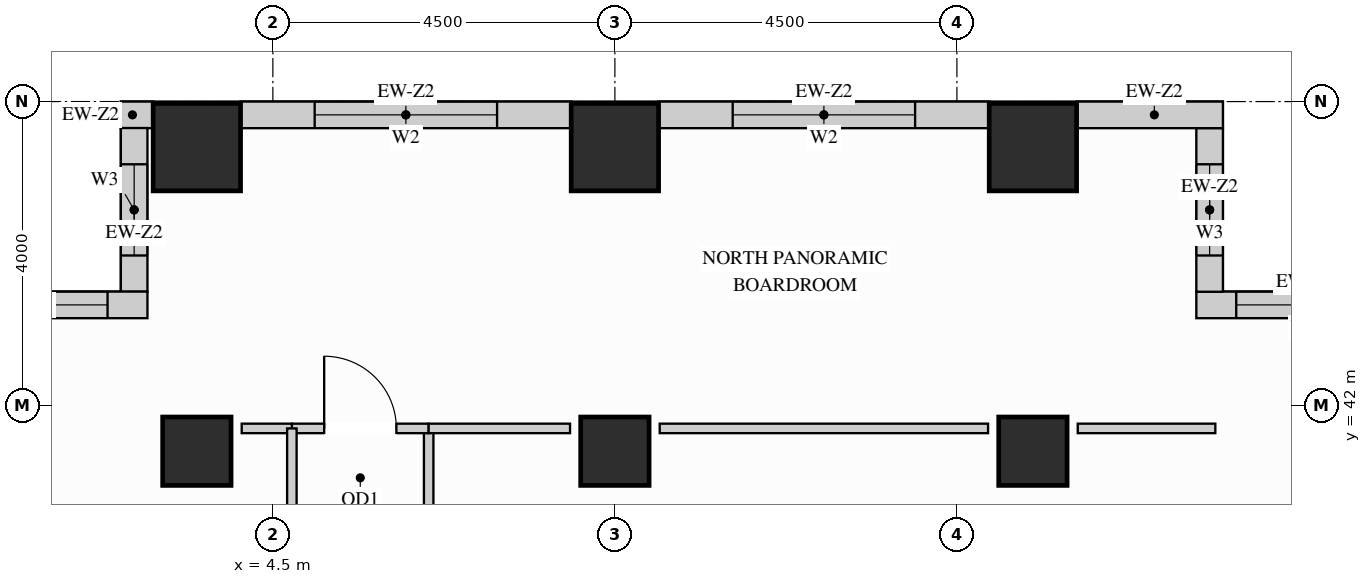
"""IFC4 building model, lengths in metres.
Left out: names, types, materials, properties, quantities, classifications, styles, units other than length and angle.
Written with IfcOpenShell. Run it as: python <this file> out.ifc"""

import sys

from ifc_helpers import new_model, si_unit, direction, frame, frame_2d, origin, origin_2d, place, context, subcontext, project, spatial, rectangle, extrude, source, transform, mapped, element, fill, save


model = new_model("IFC4")
c1 = context("Model", 3, precision=1e-05, world=origin(), true_north=direction((0.0, 1.0)))
c2 = subcontext(c1, "Body", "Model", "MODEL_VIEW")
j1 = project(units=[si_unit("LENGTHUNIT", "METRE"), si_unit("PLANEANGLEUNIT", "RADIAN")], contexts=[c1])
p1 = place(None, origin())
s1 = spatial("IfcSite", under=j1, at=p1, CompositionType="ELEMENT")
p2 = place(p1, origin())
s2 = spatial("IfcBuilding", under=s1, at=p2, CompositionType="ELEMENT")
p3 = place(p2, frame((0.0, 0.0, 135.0)))
s3 = spatial("IfcBuildingStorey", under=s2, at=p3, CompositionType="ELEMENT", Elevation=135.0)
m1 = source(origin(), c2, "Body", "SweptSolid", [
    extrude(rectangle(XDim=0.9, YDim=0.9, at=origin_2d()), origin(), (0.0, 0.0, 1.0), 3.32),
])
for number, where, z_axis, x_axis in (
    (1, (14.5, 41.4, 0.0), (0.0, 0.0, 1.0), (1.0, 0.0, 0.0)),
    (2, (3.5, 41.4, 0.0), (0.0, 0.0, 1.0), (1.0, 0.0, 0.0)),
    (3, (9.0, 41.4, 0.0), (0.0, 0.0, 1.0), (1.0, 0.0, 0.0)),
):
    element("IfcColumn", number, at=place(p3, frame(where, z_axis=z_axis, x_axis=x_axis)), inside=s3, PredefinedType="COLUMN", context=c2, shape_type="MappedRepresentation", body=[
        mapped(m1, transform((0.0, 0.0, 0.0), x_axis=(1.0, 0.0, 0.0), y_axis=(0.0, 1.0, 0.0), z_axis=(0.0, 0.0, 1.0))),
    ])
m2 = source(origin(), c2, "Body", "SweptSolid", [
    extrude(rectangle(XDim=1.15, YDim=1.15, at=origin_2d()), origin(), (0.0, 0.0, 1.0), 3.32),
])
for number, where, z_axis, x_axis in (
    (4, (14.5, 45.4, 0.0), (0.0, 0.0, 1.0), (1.0, 0.0, 0.0)),
    (5, (3.5, 45.4, 0.0), (0.0, 0.0, 1.0), (1.0, 0.0, 0.0)),
    (6, (9.0, 45.4, 0.0), (0.0, 0.0, 1.0), (1.0, 0.0, 0.0)),
):
    element("IfcColumn", number, at=place(p3, frame(where, z_axis=z_axis, x_axis=x_axis)), inside=s3, PredefinedType="COLUMN", context=c2, shape_type="MappedRepresentation", body=[
        mapped(m2, transform((0.0, 0.0, 0.0), x_axis=(1.0, 0.0, 0.0), y_axis=(0.0, 1.0, 0.0), z_axis=(0.0, 0.0, 1.0))),
    ])
p4 = place(p3, frame((19.5, 43.325, 0.0), z_axis=(0.0, 0.0, 1.0), x_axis=(-1.0, 0.0, 0.0)))
e7 = element("IfcWall", 7, at=p4, inside=s3, PredefinedType="SOLIDWALL", context=c2, shape_type="SweptSolid", body=[
    extrude(rectangle(XDim=2.85, YDim=0.35, at=frame_2d((1.425, 0.0))), origin(), (0.0, 0.0, 1.0), 3.305),
])
p5 = place(p4, frame((0.525, 0.0, 0.78)))
e8 = element("IfcOpeningElement", 8, at=p5, cuts=e7, PredefinedType="OPENING", context=c2, shape_type="SweptSolid", body=[
    extrude(rectangle(XDim=1.8, YDim=2.1, at=frame_2d((0.9, 1.05))), frame((0.0, 0.185, 0.0), z_axis=(0.0, -1.0, 0.0), x_axis=(1.0, 0.0, 0.0)), (0.0, 0.0, 1.0), 0.37),
])
p6 = place(p3, frame((16.825, 43.498, 0.0), z_axis=(0.0, 0.0, 1.0), x_axis=(0.0, 1.0, 0.0)))
e9 = element("IfcWall", 9, at=p6, inside=s3, PredefinedType="SOLIDWALL", context=c2, shape_type="SweptSolid", body=[
    extrude(rectangle(XDim=2.154, YDim=0.35, at=frame_2d((1.077, 0.0))), origin(), (0.0, 0.0, 1.0), 3.305),
])
p7 = place(p6, frame((0.477, 0.0, 0.78)))
e10 = element("IfcOpeningElement", 10, at=p7, cuts=e9, PredefinedType="OPENING", context=c2, shape_type="SweptSolid", body=[
    extrude(rectangle(XDim=1.2, YDim=2.1, at=frame_2d((0.6, 1.05))), frame((0.0, 0.185, 0.0), z_axis=(0.0, -1.0, 0.0), x_axis=(1.0, 0.0, 0.0)), (0.0, 0.0, 1.0), 0.37),
])
m3 = source(origin(), c2, "Body", "SweptSolid", [
    extrude(rectangle(XDim=1.927, YDim=0.35, at=frame_2d((0.963, 0.0))), origin(), (0.0, 0.0, 1.0), 3.305),
])
p8 = place(p3, frame((17.0, 45.825, 0.0), z_axis=(0.0, 0.0, 1.0), x_axis=(-1.0, 0.0, 0.0)))
e11 = element("IfcWall", 11, at=p8, inside=s3, PredefinedType="SOLIDWALL", context=c2, shape_type="MappedRepresentation", body=[
    mapped(m3, transform((0.0, 0.0, 0.0), x_axis=(1.0, 0.0, 0.0), y_axis=(0.0, 1.0, 0.0), z_axis=(0.0, 0.0, 1.0))),
])
p9 = place(p3, frame((13.927, 45.825, 0.0), z_axis=(0.0, 0.0, 1.0), x_axis=(-1.0, 0.0, 0.0)))
e12 = element("IfcWall", 12, at=p9, inside=s3, PredefinedType="SOLIDWALL", context=c2, shape_type="SweptSolid", body=[
    extrude(rectangle(XDim=4.354, YDim=0.35, at=frame_2d((2.177, 0.0))), origin(), (0.0, 0.0, 1.0), 3.305),
])
p10 = place(p9, frame((0.977, 0.0, 0.78)))
e13 = element("IfcOpeningElement", 13, at=p10, cuts=e12, PredefinedType="OPENING", context=c2, shape_type="SweptSolid", body=[
    extrude(rectangle(XDim=2.4, YDim=2.1, at=frame_2d((1.2, 1.05))), frame((0.0, 0.185, 0.0), z_axis=(0.0, -1.0, 0.0), x_axis=(1.0, 0.0, 0.0)), (0.0, 0.0, 1.0), 0.37),
])
p11 = place(p3, frame((8.427, 45.825, 0.0), z_axis=(0.0, 0.0, 1.0), x_axis=(-1.0, 0.0, 0.0)))
e14 = element("IfcWall", 14, at=p11, inside=s3, PredefinedType="SOLIDWALL", context=c2, shape_type="SweptSolid", body=[
    extrude(rectangle(XDim=4.354, YDim=0.35, at=frame_2d((2.177, 0.0))), origin(), (0.0, 0.0, 1.0), 3.305),
])
p12 = place(p11, frame((0.977, 0.0, 0.78)))
e15 = element("IfcOpeningElement", 15, at=p12, cuts=e14, PredefinedType="OPENING", context=c2, shape_type="SweptSolid", body=[
    extrude(rectangle(XDim=2.4, YDim=2.1, at=frame_2d((1.2, 1.05))), frame((0.0, 0.185, 0.0), z_axis=(0.0, -1.0, 0.0), x_axis=(1.0, 0.0, 0.0)), (0.0, 0.0, 1.0), 0.37),
])
m4 = source(origin(), c2, "Body", "SweptSolid", [
    extrude(rectangle(XDim=0.427, YDim=0.35, at=frame_2d((0.213, 0.0))), origin(), (0.0, 0.0, 1.0), 3.305),
])
p13 = place(p3, frame((2.927, 45.825, 0.0), z_axis=(0.0, 0.0, 1.0), x_axis=(-1.0, 0.0, 0.0)))
e16 = element("IfcWall", 16, at=p13, inside=s3, PredefinedType="SOLIDWALL", context=c2, shape_type="MappedRepresentation", body=[
    mapped(m4, transform((0.0, 0.0, 0.0), x_axis=(1.0, 0.0, 0.0), y_axis=(0.0, 1.0, 0.0), z_axis=(0.0, 0.0, 1.0))),
])
p14 = place(p3, frame((2.675, 45.652, 0.0), z_axis=(0.0, 0.0, 1.0), x_axis=(0.0, -1.0, 0.0)))
e17 = element("IfcWall", 17, at=p14, inside=s3, PredefinedType="SOLIDWALL", context=c2, shape_type="SweptSolid", body=[
    extrude(rectangle(XDim=2.154, YDim=0.35, at=frame_2d((1.077, 0.0))), origin(), (0.0, 0.0, 1.0), 3.305),
])
p15 = place(p14, frame((0.477, 0.0, 0.78)))
e18 = element("IfcOpeningElement", 18, at=p15, cuts=e17, PredefinedType="OPENING", context=c2, shape_type="SweptSolid", body=[
    extrude(rectangle(XDim=1.2, YDim=2.1, at=frame_2d((0.6, 1.05))), frame((0.0, 0.185, 0.0), z_axis=(0.0, -1.0, 0.0), x_axis=(1.0, 0.0, 0.0)), (0.0, 0.0, 1.0), 0.37),
])
p16 = place(p3, frame((2.85, 43.325, 0.0), z_axis=(0.0, 0.0, 1.0), x_axis=(-1.0, 0.0, 0.0)))
e19 = element("IfcWall", 19, at=p16, inside=s3, PredefinedType="SOLIDWALL", context=c2, shape_type="SweptSolid", body=[
    extrude(rectangle(XDim=2.85, YDim=0.35, at=frame_2d((1.425, 0.0))), origin(), (0.0, 0.0, 1.0), 3.305),
])
p17 = place(p16, frame((0.525, 0.0, 0.78)))
e20 = element("IfcOpeningElement", 20, at=p17, cuts=e19, PredefinedType="OPENING", context=c2, shape_type="SweptSolid", body=[
    extrude(rectangle(XDim=1.8, YDim=2.1, at=frame_2d((0.9, 1.05))), frame((0.0, 0.185, 0.0), z_axis=(0.0, -1.0, 0.0), x_axis=(1.0, 0.0, 0.0)), (0.0, 0.0, 1.0), 0.37),
])
p18 = place(p3, frame((6.55, 33.15, 0.0), z_axis=(0.0, 0.0, 1.0), x_axis=(0.0, 1.0, 0.0)))
e21 = element("IfcWall", 21, at=p18, inside=s3, PredefinedType="PARTITIONING", context=c2, shape_type="SweptSolid", body=[
    extrude(rectangle(XDim=8.55, YDim=0.125, at=frame_2d((4.275, 0.0))), origin(), (0.0, 0.0, 1.0), 3.305),
])
p19 = place(p18, frame((3.8, 0.0, 0.0)))
e22 = element("IfcOpeningElement", 22, at=p19, cuts=e21, PredefinedType="OPENING", context=c2, shape_type="SweptSolid", body=[
    extrude(rectangle(XDim=0.95, YDim=2.15, at=frame_2d((0.475, 1.075))), frame((0.0, 0.073, 0.0), z_axis=(0.0, -1.0, 0.0), x_axis=(1.0, 0.0, 0.0)), (0.0, 0.0, 1.0), 0.145),
])
p20 = place(p3, frame((4.75, 41.7, 0.0), z_axis=(0.0, 0.0, 1.0), x_axis=(1.0, 0.0, 0.0)))
e23 = element("IfcWall", 23, at=p20, inside=s3, PredefinedType="PARTITIONING", context=c2, shape_type="SweptSolid", body=[
    extrude(rectangle(XDim=1.8, YDim=0.125, at=frame_2d((0.9, 0.0))), origin(), (0.0, 0.0, 1.0), 3.305),
])
p21 = place(p20, frame((0.425, 0.0, 0.0)))
e24 = element("IfcOpeningElement", 24, at=p21, cuts=e23, PredefinedType="OPENING", context=c2, shape_type="SweptSolid", body=[
    extrude(rectangle(XDim=0.95, YDim=2.15, at=frame_2d((0.475, 1.075))), frame((0.0, 0.073, 0.0), z_axis=(0.0, -1.0, 0.0), x_axis=(1.0, 0.0, 0.0)), (0.0, 0.0, 1.0), 0.145),
])
m5 = source(origin(), c2, "Body", "SweptSolid", [
    extrude(rectangle(XDim=1.86, YDim=0.125, at=frame_2d((0.93, 0.0))), origin(), (0.0, 0.0, 1.0), 3.305),
])
p22 = place(p3, frame((6.55, 41.7, 0.0), z_axis=(0.0, 0.0, 1.0), x_axis=(1.0, 0.0, 0.0)))
e25 = element("IfcWall", 25, at=p22, inside=s3, PredefinedType="PARTITIONING", context=c2, shape_type="MappedRepresentation", body=[
    mapped(m5, transform((0.0, 0.0, 0.0), x_axis=(1.0, 0.0, 0.0), y_axis=(0.0, 1.0, 0.0), z_axis=(0.0, 0.0, 1.0))),
])
m6 = source(origin(), c2, "Body", "SweptSolid", [
    extrude(rectangle(XDim=4.32, YDim=0.125, at=frame_2d((2.16, 0.0))), origin(), (0.0, 0.0, 1.0), 3.305),
])
p23 = place(p3, frame((9.59, 41.7, 0.0), z_axis=(0.0, 0.0, 1.0), x_axis=(1.0, 0.0, 0.0)))
e26 = element("IfcWall", 26, at=p23, inside=s3, PredefinedType="PARTITIONING", context=c2, shape_type="MappedRepresentation", body=[
    mapped(m6, transform((0.0, 0.0, 0.0), x_axis=(1.0, 0.0, 0.0), y_axis=(0.0, 1.0, 0.0), z_axis=(0.0, 0.0, 1.0))),
])
m7 = source(origin(), c2, "Body", "SweptSolid", [
    extrude(rectangle(XDim=1.81, YDim=0.125, at=frame_2d((0.905, 0.0))), origin(), (0.0, 0.0, 1.0), 3.305),
])
p24 = place(p3, frame((15.09, 41.7, 0.0), z_axis=(0.0, 0.0, 1.0), x_axis=(1.0, 0.0, 0.0)))
e27 = element("IfcWall", 27, at=p24, inside=s3, PredefinedType="PARTITIONING", context=c2, shape_type="MappedRepresentation", body=[
    mapped(m7, transform((0.0, 0.0, 0.0), x_axis=(1.0, 0.0, 0.0), y_axis=(0.0, 1.0, 0.0), z_axis=(0.0, 0.0, 1.0))),
])
m8 = source(origin(), c2, "Body", "SweptSolid", [
    extrude(rectangle(XDim=0.66, YDim=0.125, at=frame_2d((0.33, 0.0))), origin(), (0.0, 0.0, 1.0), 3.305),
])
p25 = place(p3, frame((4.09, 41.7, 0.0), z_axis=(0.0, 0.0, 1.0), x_axis=(1.0, 0.0, 0.0)))
e28 = element("IfcWall", 28, at=p25, inside=s3, PredefinedType="PARTITIONING", context=c2, shape_type="MappedRepresentation", body=[
    mapped(m8, transform((0.0, 0.0, 0.0), x_axis=(1.0, 0.0, 0.0), y_axis=(0.0, 1.0, 0.0), z_axis=(0.0, 0.0, 1.0))),
])
p26 = place(p3, frame((4.75, 37.596, 0.0), z_axis=(0.0, 0.0, 1.0), x_axis=(0.0, 1.0, 0.0)))
e29 = element("IfcWall", 29, at=p26, inside=s3, PredefinedType="PARTITIONING", context=c2, shape_type="SweptSolid", body=[
    extrude(rectangle(XDim=4.104, YDim=0.125, at=frame_2d((2.052, 0.0))), origin(), (0.0, 0.0, 1.0), 3.305),
])
p27 = place(p26, frame((1.577, 0.0, 0.0)))
e30 = element("IfcOpeningElement", 30, at=p27, cuts=e29, PredefinedType="OPENING", context=c2, shape_type="SweptSolid", body=[
    extrude(rectangle(XDim=0.95, YDim=2.15, at=frame_2d((0.475, 1.075))), frame((0.0, 0.073, 0.0), z_axis=(0.0, -1.0, 0.0), x_axis=(1.0, 0.0, 0.0)), (0.0, 0.0, 1.0), 0.145),
])
m9 = source(origin(), c2, "Body", "SweptSolid", [
    extrude(rectangle(XDim=0.95, YDim=2.15, at=frame_2d((0.475, 1.075))), frame((0.0, 0.025, 0.0), z_axis=(0.0, -1.0, 0.0), x_axis=(1.0, 0.0, 0.0)), (0.0, 0.0, 1.0), 0.05),
])
p28 = place(p21, origin())
e31 = element("IfcDoor", 31, at=p28, inside=s3, OperationType="SINGLE_SWING_LEFT", PredefinedType="DOOR", context=c2, shape_type="MappedRepresentation", body=[
    mapped(m9, transform((0.0, 0.0, 0.0), x_axis=(1.0, 0.0, 0.0), y_axis=(0.0, 1.0, 0.0), z_axis=(0.0, 0.0, 1.0))),
])
fill(e24, e31)
m10 = source(origin(), c2, "Body", "SweptSolid", [
    extrude(rectangle(XDim=1.8, YDim=2.1, at=frame_2d((0.9, 1.05))), frame((0.0, 0.03, 0.0), z_axis=(0.0, -1.0, 0.0), x_axis=(1.0, 0.0, 0.0)), (0.0, 0.0, 1.0), 0.06),
])
p29 = place(p5, origin())
e32 = element("IfcWindow", 32, at=p29, inside=s3, PartitioningType="SINGLE_PANEL", PredefinedType="WINDOW", context=c2, shape_type="MappedRepresentation", body=[
    mapped(m10, transform((0.0, 0.0, 0.0), x_axis=(1.0, 0.0, 0.0), y_axis=(0.0, 1.0, 0.0), z_axis=(0.0, 0.0, 1.0))),
])
fill(e8, e32)
p30 = place(p17, origin())
e33 = element("IfcWindow", 33, at=p30, inside=s3, PartitioningType="SINGLE_PANEL", PredefinedType="WINDOW", context=c2, shape_type="MappedRepresentation", body=[
    mapped(m10, transform((0.0, 0.0, 0.0), x_axis=(1.0, 0.0, 0.0), y_axis=(0.0, 1.0, 0.0), z_axis=(0.0, 0.0, 1.0))),
])
fill(e20, e33)
m11 = source(origin(), c2, "Body", "SweptSolid", [
    extrude(rectangle(XDim=2.4, YDim=2.1, at=frame_2d((1.2, 1.05))), frame((0.0, 0.03, 0.0), z_axis=(0.0, -1.0, 0.0), x_axis=(1.0, 0.0, 0.0)), (0.0, 0.0, 1.0), 0.06),
])
p31 = place(p10, origin())
e34 = element("IfcWindow", 34, at=p31, inside=s3, PartitioningType="SINGLE_PANEL", PredefinedType="WINDOW", context=c2, shape_type="MappedRepresentation", body=[
    mapped(m11, transform((0.0, 0.0, 0.0), x_axis=(1.0, 0.0, 0.0), y_axis=(0.0, 1.0, 0.0), z_axis=(0.0, 0.0, 1.0))),
])
fill(e13, e34)
p32 = place(p12, origin())
e35 = element("IfcWindow", 35, at=p32, inside=s3, PartitioningType="SINGLE_PANEL", PredefinedType="WINDOW", context=c2, shape_type="MappedRepresentation", body=[
    mapped(m11, transform((0.0, 0.0, 0.0), x_axis=(1.0, 0.0, 0.0), y_axis=(0.0, 1.0, 0.0), z_axis=(0.0, 0.0, 1.0))),
])
fill(e15, e35)
m12 = source(origin(), c2, "Body", "SweptSolid", [
    extrude(rectangle(XDim=1.2, YDim=2.1, at=frame_2d((0.6, 1.05))), frame((0.0, 0.03, 0.0), z_axis=(0.0, -1.0, 0.0), x_axis=(1.0, 0.0, 0.0)), (0.0, 0.0, 1.0), 0.06),
])
p33 = place(p7, origin())
e36 = element("IfcWindow", 36, at=p33, inside=s3, PartitioningType="SINGLE_PANEL", PredefinedType="WINDOW", context=c2, shape_type="MappedRepresentation", body=[
    mapped(m12, transform((0.0, 0.0, 0.0), x_axis=(1.0, 0.0, 0.0), y_axis=(0.0, 1.0, 0.0), z_axis=(0.0, 0.0, 1.0))),
])
fill(e10, e36)
p34 = place(p15, origin())
e37 = element("IfcWindow", 37, at=p34, inside=s3, PartitioningType="SINGLE_PANEL", PredefinedType="WINDOW", context=c2, shape_type="MappedRepresentation", body=[
    mapped(m12, transform((0.0, 0.0, 0.0), x_axis=(1.0, 0.0, 0.0), y_axis=(0.0, 1.0, 0.0), z_axis=(0.0, 0.0, 1.0))),
])
fill(e18, e37)
save(model, sys.argv[1])
